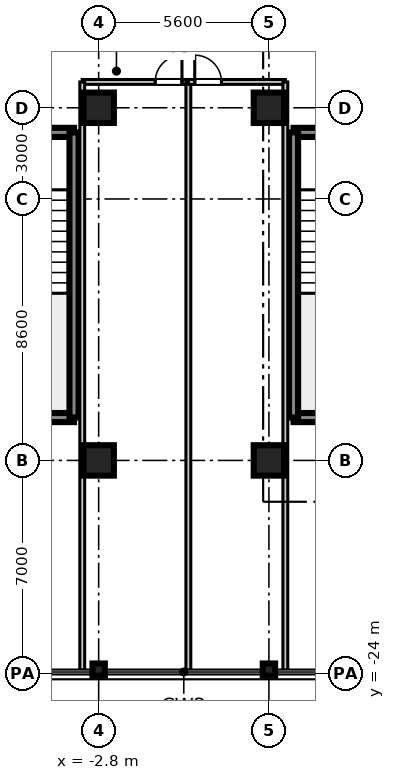
"""IFC4 building model, lengths in metres.
Left out: names, types, materials, properties, quantities, classifications, styles, units other than length and angle.
Written with IfcOpenShell. Run it as: python <this file> out.ifc"""

import sys

from ifc_helpers import new_model, si_unit, direction, frame, frame_2d, origin, origin_2d, place, context, subcontext, project, spatial, rectangle, i_section, extrude, source, transform, mapped, element, fill, save


model = new_model("IFC4")
c1 = context("Model", 3, precision=1e-05, world=origin(), true_north=direction((0.0, 1.0)))
c2 = subcontext(c1, "Body", "Model", "MODEL_VIEW")
j1 = project(units=[si_unit("LENGTHUNIT", "METRE"), si_unit("PLANEANGLEUNIT", "RADIAN")], contexts=[c1])
p1 = place(None, origin())
s1 = spatial("IfcSite", under=j1, at=p1, CompositionType="ELEMENT")
p2 = place(p1, origin())
s2 = spatial("IfcBuilding", under=s1, at=p2, CompositionType="ELEMENT")
p3 = place(p2, frame((0.0, 0.0, 249.3)))
s3 = spatial("IfcBuildingStorey", under=s2, at=p3, CompositionType="ELEMENT", Elevation=249.3)
m1 = source(origin(), c2, "Body", "SweptSolid", [
    extrude(rectangle(XDim=1.0, YDim=1.0, at=origin_2d()), origin(), (0.0, 0.0, 1.0), 3.655),
])
for number, where, z_axis, x_axis in (
    (1, (-2.8, -17.0, 0.0), (0.0, 0.0, 1.0), (1.0, 0.0, 0.0)),
    (2, (-2.8, -5.4, 0.0), (0.0, 0.0, 1.0), (1.0, 0.0, 0.0)),
    (3, (2.8, -17.0, 0.0), (0.0, 0.0, 1.0), (1.0, 0.0, 0.0)),
    (4, (2.8, -5.4, 0.0), (0.0, 0.0, 1.0), (1.0, 0.0, 0.0)),
):
    element("IfcColumn", number, at=place(p3, frame(where, z_axis=z_axis, x_axis=x_axis)), inside=s3, PredefinedType="COLUMN", context=c2, shape_type="MappedRepresentation", body=[
        mapped(m1, transform((0.0, 0.0, 0.0), scale=1.0)),
    ])
m2 = source(origin(), c2, "Body", "SweptSolid", [
    extrude(i_section(OverallWidth=0.401, OverallDepth=0.406, WebThickness=0.016, FlangeThickness=0.025, at=origin_2d()), origin(), (0.0, 0.0, 1.0), 3.655),
])
for number, where, z_axis, x_axis in (
    (5, (-2.8, -23.88, 0.0), (0.0, 0.0, 1.0), (0.0, 1.0, 0.0)),
    (6, (2.8, -23.88, 0.0), (0.0, 0.0, 1.0), (0.0, 1.0, 0.0)),
):
    element("IfcColumn", number, at=place(p3, frame(where, z_axis=z_axis, x_axis=x_axis)), inside=s3, PredefinedType="COLUMN", context=c2, shape_type="MappedRepresentation", body=[
        mapped(m2, transform((0.0, 0.0, 0.0), scale=1.0)),
    ])
m3 = source(origin(), c2, "Body", "SweptSolid", [
    extrude(rectangle(XDim=3.98, YDim=0.3, at=frame_2d((1.99, 0.0))), origin(), (0.0, 0.0, 1.0), 3.41),
])
for number, where, z_axis, x_axis in (
    (7, (3.61, -15.59, 0.0), (0.0, 0.0, 1.0), (1.0, 0.0, 0.0)),
    (8, (3.61, -6.21, 0.0), (0.0, 0.0, 1.0), (1.0, 0.0, 0.0)),
):
    element("IfcWall", number, at=place(p3, frame(where, z_axis=z_axis, x_axis=x_axis)), inside=s3, PredefinedType="SHEAR", context=c2, shape_type="MappedRepresentation", body=[
        mapped(m3, transform((0.0, 0.0, 0.0), scale=1.0)),
    ])
m4 = source(origin(), c2, "Body", "SweptSolid", [
    extrude(rectangle(XDim=9.38, YDim=0.3, at=frame_2d((4.69, 0.0))), origin(), (0.0, 0.0, 1.0), 3.41),
])
p4 = place(p3, frame((3.61, -15.59, 0.0), z_axis=(0.0, 0.0, 1.0), x_axis=(0.0, 1.0, 0.0)))
e9 = element("IfcWall", 9, at=p4, inside=s3, PredefinedType="SHEAR", context=c2, shape_type="MappedRepresentation", body=[
    mapped(m4, transform((0.0, 0.0, 0.0), scale=1.0)),
])
p5 = place(p3, frame((-7.59, -15.59, 0.0), z_axis=(0.0, 0.0, 1.0), x_axis=(1.0, 0.0, 0.0)))
e10 = element("IfcWall", 10, at=p5, inside=s3, PredefinedType="SHEAR", context=c2, shape_type="MappedRepresentation", body=[
    mapped(m3, transform((0.0, 0.0, 0.0), scale=1.0)),
])
p6 = place(p3, frame((-7.59, -6.21, 0.0), z_axis=(0.0, 0.0, 1.0), x_axis=(1.0, 0.0, 0.0)))
e11 = element("IfcWall", 11, at=p6, inside=s3, PredefinedType="SHEAR", context=c2, shape_type="MappedRepresentation", body=[
    mapped(m3, transform((0.0, 0.0, 0.0), scale=1.0)),
])
p7 = place(p6, frame((1.44, 0.0, 0.0)))
e12 = element("IfcOpeningElement", 12, at=p7, cuts=e11, PredefinedType="OPENING", context=c2, shape_type="SweptSolid", body=[
    extrude(rectangle(XDim=1.1, YDim=2.15, at=frame_2d((0.55, 1.075))), frame((0.0, 0.16, 0.0), z_axis=(0.0, -1.0, 0.0), x_axis=(1.0, 0.0, 0.0)), (0.0, 0.0, 1.0), 0.32),
])
p8 = place(p3, frame((-3.61, -15.59, 0.0), z_axis=(0.0, 0.0, 1.0), x_axis=(0.0, 1.0, 0.0)))
e13 = element("IfcWall", 13, at=p8, inside=s3, PredefinedType="SHEAR", context=c2, shape_type="MappedRepresentation", body=[
    mapped(m4, transform((0.0, 0.0, 0.0), scale=1.0)),
])
m5 = source(origin(), c2, "Body", "SweptSolid", [
    extrude(rectangle(XDim=3.49, YDim=0.16, at=frame_2d((1.745, 0.0))), origin(), (0.0, 0.0, 1.0), 2.75),
])
p9 = place(p3, frame((-3.34, -4.55, 0.0), z_axis=(0.0, 0.0, 1.0), x_axis=(1.0, 0.0, 0.0)))
e14 = element("IfcWall", 14, at=p9, inside=s3, PredefinedType="PARTITIONING", context=c2, shape_type="MappedRepresentation", body=[
    mapped(m5, transform((0.0, 0.0, 0.0), scale=1.0)),
])
p10 = place(p9, frame((2.4, 0.0, 0.0)))
e15 = element("IfcOpeningElement", 15, at=p10, cuts=e14, PredefinedType="OPENING", context=c2, shape_type="SweptSolid", body=[
    extrude(rectangle(XDim=0.88, YDim=2.1, at=frame_2d((0.44, 1.05))), frame((0.0, 0.09, 0.0), z_axis=(0.0, -1.0, 0.0), x_axis=(1.0, 0.0, 0.0)), (0.0, 0.0, 1.0), 0.18),
])
m6 = source(origin(), c2, "Body", "SweptSolid", [
    extrude(rectangle(XDim=19.35, YDim=0.16, at=frame_2d((9.675, 0.0))), origin(), (0.0, 0.0, 1.0), 2.75),
])
for number, where, z_axis, x_axis in (
    (16, (-3.34, -23.9, 0.0), (0.0, 0.0, 1.0), (0.0, 1.0, 0.0)),
    (17, (0.15, -23.9, 0.0), (0.0, 0.0, 1.0), (0.0, 1.0, 0.0)),
):
    element("IfcWall", number, at=place(p3, frame(where, z_axis=z_axis, x_axis=x_axis)), inside=s3, PredefinedType="PARTITIONING", context=c2, shape_type="MappedRepresentation", body=[
        mapped(m6, transform((0.0, 0.0, 0.0), scale=1.0)),
    ])
m7 = source(origin(), c2, "Body", "SweptSolid", [
    extrude(rectangle(XDim=3.19, YDim=0.16, at=frame_2d((1.595, 0.0))), origin(), (0.0, 0.0, 1.0), 2.75),
])
p11 = place(p3, frame((0.15, -4.55, 0.0), z_axis=(0.0, 0.0, 1.0), x_axis=(1.0, 0.0, 0.0)))
e18 = element("IfcWall", 18, at=p11, inside=s3, PredefinedType="PARTITIONING", context=c2, shape_type="MappedRepresentation", body=[
    mapped(m7, transform((0.0, 0.0, 0.0), scale=1.0)),
])
p12 = place(p11, frame((0.21, 0.0, 0.0)))
e19 = element("IfcOpeningElement", 19, at=p12, cuts=e18, PredefinedType="OPENING", context=c2, shape_type="SweptSolid", body=[
    extrude(rectangle(XDim=0.88, YDim=2.1, at=frame_2d((0.44, 1.05))), frame((0.0, 0.09, 0.0), z_axis=(0.0, -1.0, 0.0), x_axis=(1.0, 0.0, 0.0)), (0.0, 0.0, 1.0), 0.18),
])
p13 = place(p3, frame((3.34, -23.9, 0.0), z_axis=(0.0, 0.0, 1.0), x_axis=(0.0, 1.0, 0.0)))
e20 = element("IfcWall", 20, at=p13, inside=s3, PredefinedType="PARTITIONING", context=c2, shape_type="MappedRepresentation", body=[
    mapped(m6, transform((0.0, 0.0, 0.0), scale=1.0)),
])
m8 = source(origin(), c2, "Body", "SweptSolid", [
    extrude(rectangle(XDim=0.88, YDim=2.1, at=frame_2d((0.44, 1.05))), frame((0.0, 0.025, 0.0), z_axis=(0.0, -1.0, 0.0), x_axis=(1.0, 0.0, 0.0)), (0.0, 0.0, 1.0), 0.05),
])
p14 = place(p10, frame((0.88, 0.0, 0.0), z_axis=(0.0, 0.0, 1.0), x_axis=(-1.0, 0.0, 0.0)))
e21 = element("IfcDoor", 21, at=p14, inside=s3, OperationType="SINGLE_SWING_RIGHT", PredefinedType="DOOR", context=c2, shape_type="MappedRepresentation", body=[
    mapped(m8, transform((0.0, 0.0, 0.0), scale=1.0)),
])
fill(e15, e21)
p15 = place(p12, frame((0.88, 0.0, 0.0), z_axis=(0.0, 0.0, 1.0), x_axis=(-1.0, 0.0, 0.0)))
e22 = element("IfcDoor", 22, at=p15, inside=s3, OperationType="SINGLE_SWING_LEFT", PredefinedType="DOOR", context=c2, shape_type="MappedRepresentation", body=[
    mapped(m8, transform((0.0, 0.0, 0.0), scale=1.0)),
])
fill(e19, e22)
save(model, sys.argv[1])
